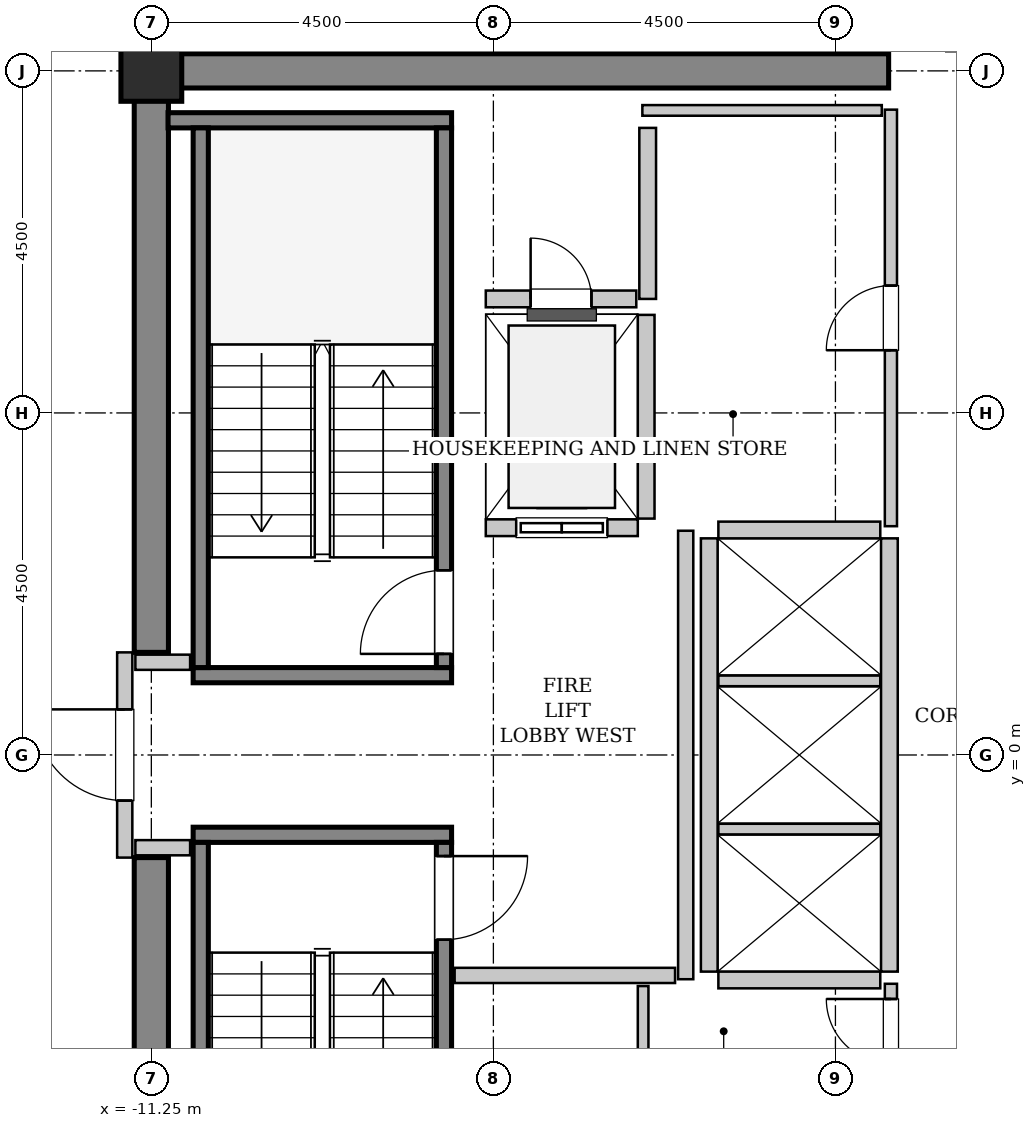
"""IFC4 building model, lengths in metres.
Left out: names, types, materials, properties, quantities, classifications, styles, units other than length and angle.
Written with IfcOpenShell. Run it as: python <this file> out.ifc"""

import sys

from ifc_helpers import new_model, si_unit, direction, frame, frame_2d, origin, origin_2d, place, context, subcontext, project, spatial, rectangle, hollow_rectangle, extrude, source, transform, mapped, element, fill, save


model = new_model("IFC4")
c1 = context("Model", 3, precision=1e-05, world=origin(), true_north=direction((0.0, 1.0)))
c2 = subcontext(c1, "Body", "Model", "MODEL_VIEW")
j1 = project(units=[si_unit("LENGTHUNIT", "METRE"), si_unit("PLANEANGLEUNIT", "RADIAN")], contexts=[c1])
p1 = place(None, origin())
s1 = spatial("IfcSite", under=j1, at=p1, CompositionType="ELEMENT")
p2 = place(p1, origin())
s2 = spatial("IfcBuilding", under=s1, at=p2, CompositionType="ELEMENT")
p3 = place(p2, frame((0.0, 0.0, 229.4)))
s3 = spatial("IfcBuildingStorey", under=s2, at=p3, CompositionType="ELEMENT", Elevation=229.4)
m1 = source(origin(), c2, "Body", "SweptSolid", [
    extrude(rectangle(XDim=9.925, YDim=0.45, at=frame_2d((4.962, 0.0))), origin(), (0.0, 0.0, 1.0), 3.8),
])
p4 = place(p3, frame((-11.475, 9.0, 0.0), z_axis=(0.0, 0.0, 1.0), x_axis=(1.0, 0.0, 0.0)))
e1 = element("IfcWall", 1, at=p4, inside=s3, PredefinedType="SHEAR", context=c2, shape_type="MappedRepresentation", body=[
    mapped(m1, transform((0.0, 0.0, 0.0), x_axis=(1.0, 0.0, 0.0), y_axis=(0.0, 1.0, 0.0), z_axis=(0.0, 0.0, 1.0), scale=1.0)),
])
m2 = source(origin(), c2, "Body", "SweptSolid", [
    extrude(rectangle(XDim=7.425, YDim=0.45, at=frame_2d((3.712, 0.0))), origin(), (0.0, 0.0, 1.0), 3.8),
])
for number, where, z_axis, x_axis in (
    (2, (-11.25, -8.775, 0.0), (0.0, 0.0, 1.0), (0.0, 1.0, 0.0)),
    (3, (-11.25, 1.35, 0.0), (0.0, 0.0, 1.0), (0.0, 1.0, 0.0)),
):
    element("IfcWall", number, at=place(p3, frame(where, z_axis=z_axis, x_axis=x_axis)), inside=s3, PredefinedType="SHEAR", context=c2, shape_type="MappedRepresentation", body=[
        mapped(m2, transform((0.0, 0.0, 0.0), x_axis=(1.0, 0.0, 0.0), y_axis=(0.0, 1.0, 0.0), z_axis=(0.0, 0.0, 1.0), scale=1.0)),
    ])
m3 = source(origin(), c2, "Body", "SweptSolid", [
    extrude(hollow_rectangle(XDim=0.8, YDim=0.8, WallThickness=0.04, InnerFilletRadius=0.04, OuterFilletRadius=0.08, at=origin_2d()), origin(), (0.0, 0.0, 1.0), 3.8),
])
p5 = place(p3, frame((-11.25, 9.0, 0.0), z_axis=(0.0, 0.0, 1.0), x_axis=(1.0, 0.0, 0.0)))
e4 = element("IfcColumn", 4, at=p5, inside=s3, PredefinedType="COLUMN", context=c2, shape_type="MappedRepresentation", body=[
    mapped(m3, transform((0.0, 0.0, 0.0), x_axis=(1.0, 0.0, 0.0), y_axis=(0.0, 1.0, 0.0), z_axis=(0.0, 0.0, 1.0), scale=1.0)),
])
m4 = source(origin(), c2, "Body", "SweptSolid", [
    extrude(rectangle(XDim=3.4, YDim=0.2, at=frame_2d((1.7, 0.0))), origin(), (0.0, 0.0, 1.0), 3.8),
])
p6 = place(p3, frame((-7.3, 1.05, 0.0), z_axis=(0.0, 0.0, 1.0), x_axis=(-1.0, 0.0, 0.0)))
e5 = element("IfcWall", 5, at=p6, inside=s3, PredefinedType="SOLIDWALL", context=c2, shape_type="MappedRepresentation", body=[
    mapped(m4, transform((0.0, 0.0, 0.0), x_axis=(1.0, 0.0, 0.0), y_axis=(0.0, 1.0, 0.0), z_axis=(0.0, 0.0, 1.0), scale=1.0)),
])
m5 = source(origin(), c2, "Body", "SweptSolid", [
    extrude(rectangle(XDim=3.73, YDim=0.2, at=frame_2d((1.865, 0.0))), origin(), (0.0, 0.0, 1.0), 3.8),
])
p7 = place(p3, frame((-7.3, 8.35, 0.0), z_axis=(0.0, 0.0, 1.0), x_axis=(-1.0, 0.0, 0.0)))
e6 = element("IfcWall", 6, at=p7, inside=s3, PredefinedType="SOLIDWALL", context=c2, shape_type="MappedRepresentation", body=[
    mapped(m5, transform((0.0, 0.0, 0.0), x_axis=(1.0, 0.0, 0.0), y_axis=(0.0, 1.0, 0.0), z_axis=(0.0, 0.0, 1.0), scale=1.0)),
])
m6 = source(origin(), c2, "Body", "SweptSolid", [
    extrude(rectangle(XDim=7.1, YDim=0.2, at=frame_2d((3.55, 0.0))), origin(), (0.0, 0.0, 1.0), 3.8),
])
p8 = place(p3, frame((-7.4, 1.15, 0.0), z_axis=(0.0, 0.0, 1.0), x_axis=(0.0, 1.0, 0.0)))
e7 = element("IfcWall", 7, at=p8, inside=s3, PredefinedType="SOLIDWALL", context=c2, shape_type="MappedRepresentation", body=[
    mapped(m6, transform((0.0, 0.0, 0.0), x_axis=(1.0, 0.0, 0.0), y_axis=(0.0, 1.0, 0.0), z_axis=(0.0, 0.0, 1.0), scale=1.0)),
])
p9 = place(p8, frame((0.18, 0.0, 0.0)))
e8 = element("IfcOpeningElement", 8, at=p9, cuts=e7, PredefinedType="OPENING", context=c2, shape_type="SweptSolid", body=[
    extrude(rectangle(XDim=1.1, YDim=2.15, at=frame_2d((0.55, 1.075))), frame((0.0, 0.11, 0.0), z_axis=(0.0, -1.0, 0.0), x_axis=(1.0, 0.0, 0.0)), (0.0, 0.0, 1.0), 0.22),
])
p10 = place(p3, frame((-10.6, 1.15, 0.0), z_axis=(0.0, 0.0, 1.0), x_axis=(0.0, 1.0, 0.0)))
e9 = element("IfcWall", 9, at=p10, inside=s3, PredefinedType="SOLIDWALL", context=c2, shape_type="MappedRepresentation", body=[
    mapped(m6, transform((0.0, 0.0, 0.0), x_axis=(1.0, 0.0, 0.0), y_axis=(0.0, 1.0, 0.0), z_axis=(0.0, 0.0, 1.0), scale=1.0)),
])
p11 = place(p3, frame((-10.7, -1.05, 0.0), z_axis=(0.0, 0.0, 1.0), x_axis=(1.0, 0.0, 0.0)))
e10 = element("IfcWall", 10, at=p11, inside=s3, PredefinedType="SOLIDWALL", context=c2, shape_type="MappedRepresentation", body=[
    mapped(m4, transform((0.0, 0.0, 0.0), x_axis=(1.0, 0.0, 0.0), y_axis=(0.0, 1.0, 0.0), z_axis=(0.0, 0.0, 1.0), scale=1.0)),
])
p12 = place(p3, frame((-10.6, -1.15, 0.0), z_axis=(0.0, 0.0, 1.0), x_axis=(0.0, -1.0, 0.0)))
e11 = element("IfcWall", 11, at=p12, inside=s3, PredefinedType="SOLIDWALL", context=c2, shape_type="MappedRepresentation", body=[
    mapped(m6, transform((0.0, 0.0, 0.0), x_axis=(1.0, 0.0, 0.0), y_axis=(0.0, 1.0, 0.0), z_axis=(0.0, 0.0, 1.0), scale=1.0)),
])
p13 = place(p3, frame((-7.4, -1.15, 0.0), z_axis=(0.0, 0.0, 1.0), x_axis=(0.0, -1.0, 0.0)))
e12 = element("IfcWall", 12, at=p13, inside=s3, PredefinedType="SOLIDWALL", context=c2, shape_type="MappedRepresentation", body=[
    mapped(m6, transform((0.0, 0.0, 0.0), x_axis=(1.0, 0.0, 0.0), y_axis=(0.0, 1.0, 0.0), z_axis=(0.0, 0.0, 1.0), scale=1.0)),
])
p14 = place(p13, frame((0.18, 0.0, 0.0)))
e13 = element("IfcOpeningElement", 13, at=p14, cuts=e12, PredefinedType="OPENING", context=c2, shape_type="SweptSolid", body=[
    extrude(rectangle(XDim=1.1, YDim=2.15, at=frame_2d((0.55, 1.075))), frame((0.0, 0.11, 0.0), z_axis=(0.0, -1.0, 0.0), x_axis=(1.0, 0.0, 0.0)), (0.0, 0.0, 1.0), 0.22),
])
m7 = source(origin(), c2, "Body", "SweptSolid", [
    extrude(rectangle(XDim=2.0, YDim=0.22, at=frame_2d((1.0, 0.0))), origin(), (0.0, 0.0, 1.0), 3.535),
])
p15 = place(p3, frame((-6.85, 2.99, 0.0), z_axis=(0.0, 0.0, 1.0), x_axis=(1.0, 0.0, 0.0)))
e14 = element("IfcWall", 14, at=p15, inside=s3, PredefinedType="SOLIDWALL", context=c2, shape_type="MappedRepresentation", body=[
    mapped(m7, transform((0.0, 0.0, 0.0), x_axis=(1.0, 0.0, 0.0), y_axis=(0.0, 1.0, 0.0), z_axis=(0.0, 0.0, 1.0), scale=1.0)),
])
p16 = place(p15, frame((0.4, 0.0, 0.0)))
e15 = element("IfcOpeningElement", 15, at=p16, cuts=e14, PredefinedType="OPENING", context=c2, shape_type="SweptSolid", body=[
    extrude(rectangle(XDim=1.2, YDim=2.2, at=frame_2d((0.6, 1.1))), frame((0.0, 0.12, 0.0), z_axis=(0.0, -1.0, 0.0), x_axis=(1.0, 0.0, 0.0)), (0.0, 0.0, 1.0), 0.24),
])
m8 = source(origin(), c2, "Body", "SweptSolid", [
    extrude(rectangle(XDim=2.68, YDim=0.22, at=frame_2d((1.34, 0.0))), origin(), (0.0, 0.0, 1.0), 3.535),
])
p17 = place(p3, frame((-4.74, 3.11, 0.0), z_axis=(0.0, 0.0, 1.0), x_axis=(0.0, 1.0, 0.0)))
e16 = element("IfcWall", 16, at=p17, inside=s3, PredefinedType="SOLIDWALL", context=c2, shape_type="MappedRepresentation", body=[
    mapped(m8, transform((0.0, 0.0, 0.0), x_axis=(1.0, 0.0, 0.0), y_axis=(0.0, 1.0, 0.0), z_axis=(0.0, 0.0, 1.0), scale=1.0)),
])
m9 = source(origin(), c2, "Body", "SweptSolid", [
    extrude(rectangle(XDim=5.7, YDim=0.22, at=frame_2d((2.85, 0.0))), origin(), (0.0, 0.0, 1.0), 3.535),
])
for number, where, z_axis, x_axis in (
    (17, (-1.54, -2.85, 0.0), (0.0, 0.0, 1.0), (0.0, 1.0, 0.0)),
    (18, (-3.91, 2.85, 0.0), (0.0, 0.0, 1.0), (0.0, -1.0, 0.0)),
):
    element("IfcWall", number, at=place(p3, frame(where, z_axis=z_axis, x_axis=x_axis)), inside=s3, PredefinedType="SOLIDWALL", context=c2, shape_type="MappedRepresentation", body=[
        mapped(m9, transform((0.0, 0.0, 0.0), x_axis=(1.0, 0.0, 0.0), y_axis=(0.0, 1.0, 0.0), z_axis=(0.0, 0.0, 1.0), scale=1.0)),
    ])
m10 = source(origin(), c2, "Body", "SweptSolid", [
    extrude(rectangle(XDim=2.13, YDim=0.22, at=frame_2d((1.065, 0.0))), origin(), (0.0, 0.0, 1.0), 3.535),
])
p18 = place(p3, frame((-3.79, -2.96, 0.0), z_axis=(0.0, 0.0, 1.0), x_axis=(1.0, 0.0, 0.0)))
e19 = element("IfcWall", 19, at=p18, inside=s3, PredefinedType="SOLIDWALL", context=c2, shape_type="MappedRepresentation", body=[
    mapped(m10, transform((0.0, 0.0, 0.0), x_axis=(1.0, 0.0, 0.0), y_axis=(0.0, 1.0, 0.0), z_axis=(0.0, 0.0, 1.0), scale=1.0)),
])
m11 = source(origin(), c2, "Body", "SweptSolid", [
    extrude(rectangle(XDim=2.13, YDim=0.14, at=frame_2d((1.065, 0.0))), origin(), (0.0, 0.0, 1.0), 3.535),
])
for number, where, z_axis, x_axis in (
    (20, (-3.79, -0.975, 0.0), (0.0, 0.0, 1.0), (1.0, 0.0, 0.0)),
    (21, (-3.79, 0.975, 0.0), (0.0, 0.0, 1.0), (1.0, 0.0, 0.0)),
):
    element("IfcWall", number, at=place(p3, frame(where, z_axis=z_axis, x_axis=x_axis)), inside=s3, PredefinedType="PARTITIONING", context=c2, shape_type="MappedRepresentation", body=[
        mapped(m11, transform((0.0, 0.0, 0.0), x_axis=(1.0, 0.0, 0.0), y_axis=(0.0, 1.0, 0.0), z_axis=(0.0, 0.0, 1.0), scale=1.0)),
    ])
p19 = place(p3, frame((-1.66, 2.96, 0.0), z_axis=(0.0, 0.0, 1.0), x_axis=(-1.0, 0.0, 0.0)))
e22 = element("IfcWall", 22, at=p19, inside=s3, PredefinedType="SOLIDWALL", context=c2, shape_type="MappedRepresentation", body=[
    mapped(m10, transform((0.0, 0.0, 0.0), x_axis=(1.0, 0.0, 0.0), y_axis=(0.0, 1.0, 0.0), z_axis=(0.0, 0.0, 1.0), scale=1.0)),
])
m12 = source(origin(), c2, "Body", "SweptSolid", [
    extrude(rectangle(XDim=2.25, YDim=0.22, at=frame_2d((1.125, 0.0))), origin(), (0.0, 0.0, 1.0), 3.535),
])
p20 = place(p3, frame((-4.72, 6.0, 0.0), z_axis=(0.0, 0.0, 1.0), x_axis=(0.0, 1.0, 0.0)))
e23 = element("IfcWall", 23, at=p20, inside=s3, PredefinedType="SOLIDWALL", context=c2, shape_type="MappedRepresentation", body=[
    mapped(m12, transform((0.0, 0.0, 0.0), x_axis=(1.0, 0.0, 0.0), y_axis=(0.0, 1.0, 0.0), z_axis=(0.0, 0.0, 1.0), scale=1.0)),
])
m13 = source(origin(), c2, "Body", "SweptSolid", [
    extrude(rectangle(XDim=1.98, YDim=0.22, at=frame_2d((0.99, 0.0))), origin(), (0.0, 0.0, 1.0), 3.535),
])
p21 = place(p3, frame((-6.85, 6.0, 0.0), z_axis=(0.0, 0.0, 1.0), x_axis=(1.0, 0.0, 0.0)))
e24 = element("IfcWall", 24, at=p21, inside=s3, PredefinedType="SOLIDWALL", context=c2, shape_type="MappedRepresentation", body=[
    mapped(m13, transform((0.0, 0.0, 0.0), x_axis=(1.0, 0.0, 0.0), y_axis=(0.0, 1.0, 0.0), z_axis=(0.0, 0.0, 1.0), scale=1.0)),
])
p22 = place(p21, frame((0.59, 0.0, 0.0)))
e25 = element("IfcOpeningElement", 25, at=p22, cuts=e24, PredefinedType="OPENING", context=c2, shape_type="SweptSolid", body=[
    extrude(rectangle(XDim=0.8, YDim=2.0, at=frame_2d((0.4, 1.0))), frame((0.0, 0.12, 0.0), z_axis=(0.0, -1.0, 0.0), x_axis=(1.0, 0.0, 0.0)), (0.0, 0.0, 1.0), 0.24),
])
m14 = source(origin(), c2, "Body", "SweptSolid", [
    extrude(rectangle(XDim=2.7, YDim=0.2, at=frame_2d((1.35, 0.0))), origin(), (0.0, 0.0, 1.0), 2.625),
])
p23 = place(p3, frame((-11.6, -1.35, 0.0), z_axis=(0.0, 0.0, 1.0), x_axis=(0.0, 1.0, 0.0)))
e26 = element("IfcWall", 26, at=p23, inside=s3, PredefinedType="PARTITIONING", context=c2, shape_type="MappedRepresentation", body=[
    mapped(m14, transform((0.0, 0.0, 0.0), x_axis=(1.0, 0.0, 0.0), y_axis=(0.0, 1.0, 0.0), z_axis=(0.0, 0.0, 1.0), scale=1.0)),
])
p24 = place(p23, frame((0.75, 0.0, 0.0)))
e27 = element("IfcOpeningElement", 27, at=p24, cuts=e26, PredefinedType="OPENING", context=c2, shape_type="SweptSolid", body=[
    extrude(rectangle(XDim=1.2, YDim=2.15, at=frame_2d((0.6, 1.075))), frame((0.0, 0.11, 0.0), z_axis=(0.0, -1.0, 0.0), x_axis=(1.0, 0.0, 0.0)), (0.0, 0.0, 1.0), 0.22),
])
m15 = source(origin(), c2, "Body", "SweptSolid", [
    extrude(rectangle(XDim=5.9, YDim=0.2, at=frame_2d((2.95, 0.0))), origin(), (0.0, 0.0, 1.0), 3.535),
])
p25 = place(p3, frame((-4.22, -2.95, 0.0), z_axis=(0.0, 0.0, 1.0), x_axis=(0.0, 1.0, 0.0)))
e28 = element("IfcWall", 28, at=p25, inside=s3, PredefinedType="PARTITIONING", context=c2, shape_type="MappedRepresentation", body=[
    mapped(m15, transform((0.0, 0.0, 0.0), x_axis=(1.0, 0.0, 0.0), y_axis=(0.0, 1.0, 0.0), z_axis=(0.0, 0.0, 1.0), scale=1.0)),
])
m16 = source(origin(), c2, "Body", "SweptSolid", [
    extrude(rectangle(XDim=2.9, YDim=0.2, at=frame_2d((1.45, 0.0))), origin(), (0.0, 0.0, 1.0), 3.535),
])
p26 = place(p3, frame((-7.26, -2.9, 0.0), z_axis=(0.0, 0.0, 1.0), x_axis=(1.0, 0.0, 0.0)))
e29 = element("IfcWall", 29, at=p26, inside=s3, PredefinedType="PARTITIONING", context=c2, shape_type="MappedRepresentation", body=[
    mapped(m16, transform((0.0, 0.0, 0.0), x_axis=(1.0, 0.0, 0.0), y_axis=(0.0, 1.0, 0.0), z_axis=(0.0, 0.0, 1.0), scale=1.0)),
])
m17 = source(origin(), c2, "Body", "SweptSolid", [
    extrude(rectangle(XDim=0.72, YDim=0.2, at=frame_2d((0.36, 0.0))), origin(), (0.0, 0.0, 1.0), 3.535),
])
for number, where, z_axis, x_axis in (
    (30, (-11.46, 1.22, 0.0), (0.0, 0.0, 1.0), (1.0, 0.0, 0.0)),
    (31, (-11.46, -1.22, 0.0), (0.0, 0.0, 1.0), (1.0, 0.0, 0.0)),
):
    element("IfcWall", number, at=place(p3, frame(where, z_axis=z_axis, x_axis=x_axis)), inside=s3, PredefinedType="PARTITIONING", context=c2, shape_type="MappedRepresentation", body=[
        mapped(m17, transform((0.0, 0.0, 0.0), x_axis=(1.0, 0.0, 0.0), y_axis=(0.0, 1.0, 0.0), z_axis=(0.0, 0.0, 1.0), scale=1.0)),
    ])
m18 = source(origin(), c2, "Body", "SweptSolid", [
    extrude(rectangle(XDim=5.48, YDim=0.16, at=frame_2d((2.74, 0.0))), origin(), (0.0, 0.0, 1.0), 3.535),
])
p27 = place(p3, frame((-1.52, 3.01, 0.0), z_axis=(0.0, 0.0, 1.0), x_axis=(0.0, 1.0, 0.0)))
e32 = element("IfcWall", 32, at=p27, inside=s3, PredefinedType="PARTITIONING", context=c2, shape_type="MappedRepresentation", body=[
    mapped(m18, transform((0.0, 0.0, 0.0), x_axis=(1.0, 0.0, 0.0), y_axis=(0.0, 1.0, 0.0), z_axis=(0.0, 0.0, 1.0), scale=1.0)),
])
p28 = place(p27, frame((2.315, 0.0, 0.0)))
e33 = element("IfcOpeningElement", 33, at=p28, cuts=e32, PredefinedType="OPENING", context=c2, shape_type="SweptSolid", body=[
    extrude(rectangle(XDim=0.85, YDim=2.1, at=frame_2d((0.425, 1.05))), frame((0.0, 0.09, 0.0), z_axis=(0.0, -1.0, 0.0), x_axis=(1.0, 0.0, 0.0)), (0.0, 0.0, 1.0), 0.18),
])
m19 = source(origin(), c2, "Body", "SweptSolid", [
    extrude(rectangle(XDim=3.15, YDim=0.14, at=frame_2d((1.575, 0.0))), origin(), (0.0, 0.0, 1.0), 3.535),
])
p29 = place(p3, frame((-4.79, 8.48, 0.0), z_axis=(0.0, 0.0, 1.0), x_axis=(1.0, 0.0, 0.0)))
e34 = element("IfcWall", 34, at=p29, inside=s3, PredefinedType="PARTITIONING", context=c2, shape_type="MappedRepresentation", body=[
    mapped(m19, transform((0.0, 0.0, 0.0), x_axis=(1.0, 0.0, 0.0), y_axis=(0.0, 1.0, 0.0), z_axis=(0.0, 0.0, 1.0), scale=1.0)),
])
m20 = source(origin(), c2, "Body", "SweptSolid", [
    extrude(rectangle(XDim=1.25, YDim=0.16, at=frame_2d((0.625, 0.0))), origin(), (0.0, 0.0, 1.0), 3.535),
])
p30 = place(p3, frame((-1.52, -4.26, 0.0), z_axis=(0.0, 0.0, 1.0), x_axis=(0.0, 1.0, 0.0)))
e35 = element("IfcWall", 35, at=p30, inside=s3, PredefinedType="PARTITIONING", context=c2, shape_type="MappedRepresentation", body=[
    mapped(m20, transform((0.0, 0.0, 0.0), x_axis=(1.0, 0.0, 0.0), y_axis=(0.0, 1.0, 0.0), z_axis=(0.0, 0.0, 1.0), scale=1.0)),
])
p31 = place(p30, frame((0.2, 0.0, 0.0)))
e36 = element("IfcOpeningElement", 36, at=p31, cuts=e35, PredefinedType="OPENING", context=c2, shape_type="SweptSolid", body=[
    extrude(rectangle(XDim=0.85, YDim=2.1, at=frame_2d((0.425, 1.05))), frame((0.0, 0.09, 0.0), z_axis=(0.0, -1.0, 0.0), x_axis=(1.0, 0.0, 0.0)), (0.0, 0.0, 1.0), 0.18),
])
m21 = source(origin(), c2, "Body", "SweptSolid", [
    extrude(rectangle(XDim=1.1, YDim=0.14, at=frame_2d((0.55, 0.0))), origin(), (0.0, 0.0, 1.0), 3.535),
])
p32 = place(p3, frame((-4.78, -4.14, 0.0), z_axis=(0.0, 0.0, 1.0), x_axis=(0.0, 1.0, 0.0)))
e37 = element("IfcWall", 37, at=p32, inside=s3, PredefinedType="PARTITIONING", context=c2, shape_type="MappedRepresentation", body=[
    mapped(m21, transform((0.0, 0.0, 0.0), x_axis=(1.0, 0.0, 0.0), y_axis=(0.0, 1.0, 0.0), z_axis=(0.0, 0.0, 1.0), scale=1.0)),
])
m22 = source(origin(), c2, "Body", "SweptSolid", [
    extrude(rectangle(XDim=1.1, YDim=2.15, at=frame_2d((0.55, 1.075))), frame((0.0, 0.025, 0.0), z_axis=(0.0, -1.0, 0.0), x_axis=(1.0, 0.0, 0.0)), (0.0, 0.0, 1.0), 0.05),
])
p33 = place(p9, origin())
e38 = element("IfcDoor", 38, at=p33, inside=s3, OperationType="SINGLE_SWING_LEFT", PredefinedType="DOOR", context=c2, shape_type="MappedRepresentation", body=[
    mapped(m22, transform((0.0, 0.0, 0.0), x_axis=(1.0, 0.0, 0.0), y_axis=(0.0, 1.0, 0.0), z_axis=(0.0, 0.0, 1.0), scale=1.0)),
])
fill(e8, e38)
p34 = place(p14, origin())
e39 = element("IfcDoor", 39, at=p34, inside=s3, OperationType="SINGLE_SWING_LEFT", PredefinedType="DOOR", context=c2, shape_type="MappedRepresentation", body=[
    mapped(m22, transform((0.0, 0.0, 0.0), x_axis=(1.0, 0.0, 0.0), y_axis=(0.0, 1.0, 0.0), z_axis=(0.0, 0.0, 1.0), scale=1.0)),
])
fill(e13, e39)
m23 = source(origin(), c2, "Body", "SweptSolid", [
    extrude(rectangle(XDim=1.2, YDim=2.2, at=frame_2d((0.6, 1.1))), frame((0.0, 0.025, 0.0), z_axis=(0.0, -1.0, 0.0), x_axis=(1.0, 0.0, 0.0)), (0.0, 0.0, 1.0), 0.05),
])
p35 = place(p16, origin())
e40 = element("IfcDoor", 40, at=p35, inside=s3, OperationType="SLIDING_TO_LEFT", PredefinedType="DOOR", context=c2, shape_type="MappedRepresentation", body=[
    mapped(m23, transform((0.0, 0.0, 0.0), x_axis=(1.0, 0.0, 0.0), y_axis=(0.0, 1.0, 0.0), z_axis=(0.0, 0.0, 1.0), scale=1.0)),
])
fill(e15, e40)
m24 = source(origin(), c2, "Body", "SweptSolid", [
    extrude(rectangle(XDim=0.8, YDim=2.0, at=frame_2d((0.4, 1.0))), frame((0.0, 0.025, 0.0), z_axis=(0.0, -1.0, 0.0), x_axis=(1.0, 0.0, 0.0)), (0.0, 0.0, 1.0), 0.05),
])
p36 = place(p22, origin())
e41 = element("IfcDoor", 41, at=p36, inside=s3, OperationType="SINGLE_SWING_LEFT", PredefinedType="TRAPDOOR", context=c2, shape_type="MappedRepresentation", body=[
    mapped(m24, transform((0.0, 0.0, 0.0), x_axis=(1.0, 0.0, 0.0), y_axis=(0.0, 1.0, 0.0), z_axis=(0.0, 0.0, 1.0), scale=1.0)),
])
fill(e25, e41)
m25 = source(origin(), c2, "Body", "SweptSolid", [
    extrude(rectangle(XDim=1.2, YDim=2.15, at=frame_2d((0.6, 1.075))), frame((0.0, 0.025, 0.0), z_axis=(0.0, -1.0, 0.0), x_axis=(1.0, 0.0, 0.0)), (0.0, 0.0, 1.0), 0.05),
])
p37 = place(p24, origin())
e42 = element("IfcDoor", 42, at=p37, inside=s3, OperationType="SINGLE_SWING_RIGHT", PredefinedType="DOOR", context=c2, shape_type="MappedRepresentation", body=[
    mapped(m25, transform((0.0, 0.0, 0.0), x_axis=(1.0, 0.0, 0.0), y_axis=(0.0, 1.0, 0.0), z_axis=(0.0, 0.0, 1.0), scale=1.0)),
])
fill(e27, e42)
m26 = source(origin(), c2, "Body", "SweptSolid", [
    extrude(rectangle(XDim=0.85, YDim=2.1, at=frame_2d((0.425, 1.05))), frame((0.0, 0.025, 0.0), z_axis=(0.0, -1.0, 0.0), x_axis=(1.0, 0.0, 0.0)), (0.0, 0.0, 1.0), 0.05),
])
p38 = place(p28, origin())
e43 = element("IfcDoor", 43, at=p38, inside=s3, OperationType="SINGLE_SWING_LEFT", PredefinedType="DOOR", context=c2, shape_type="MappedRepresentation", body=[
    mapped(m26, transform((0.0, 0.0, 0.0), x_axis=(1.0, 0.0, 0.0), y_axis=(0.0, 1.0, 0.0), z_axis=(0.0, 0.0, 1.0), scale=1.0)),
])
fill(e33, e43)
p39 = place(p31, origin())
e44 = element("IfcDoor", 44, at=p39, inside=s3, OperationType="SINGLE_SWING_RIGHT", PredefinedType="DOOR", context=c2, shape_type="MappedRepresentation", body=[
    mapped(m26, transform((0.0, 0.0, 0.0), x_axis=(1.0, 0.0, 0.0), y_axis=(0.0, 1.0, 0.0), z_axis=(0.0, 0.0, 1.0), scale=1.0)),
])
fill(e36, e44)
save(model, sys.argv[1])
